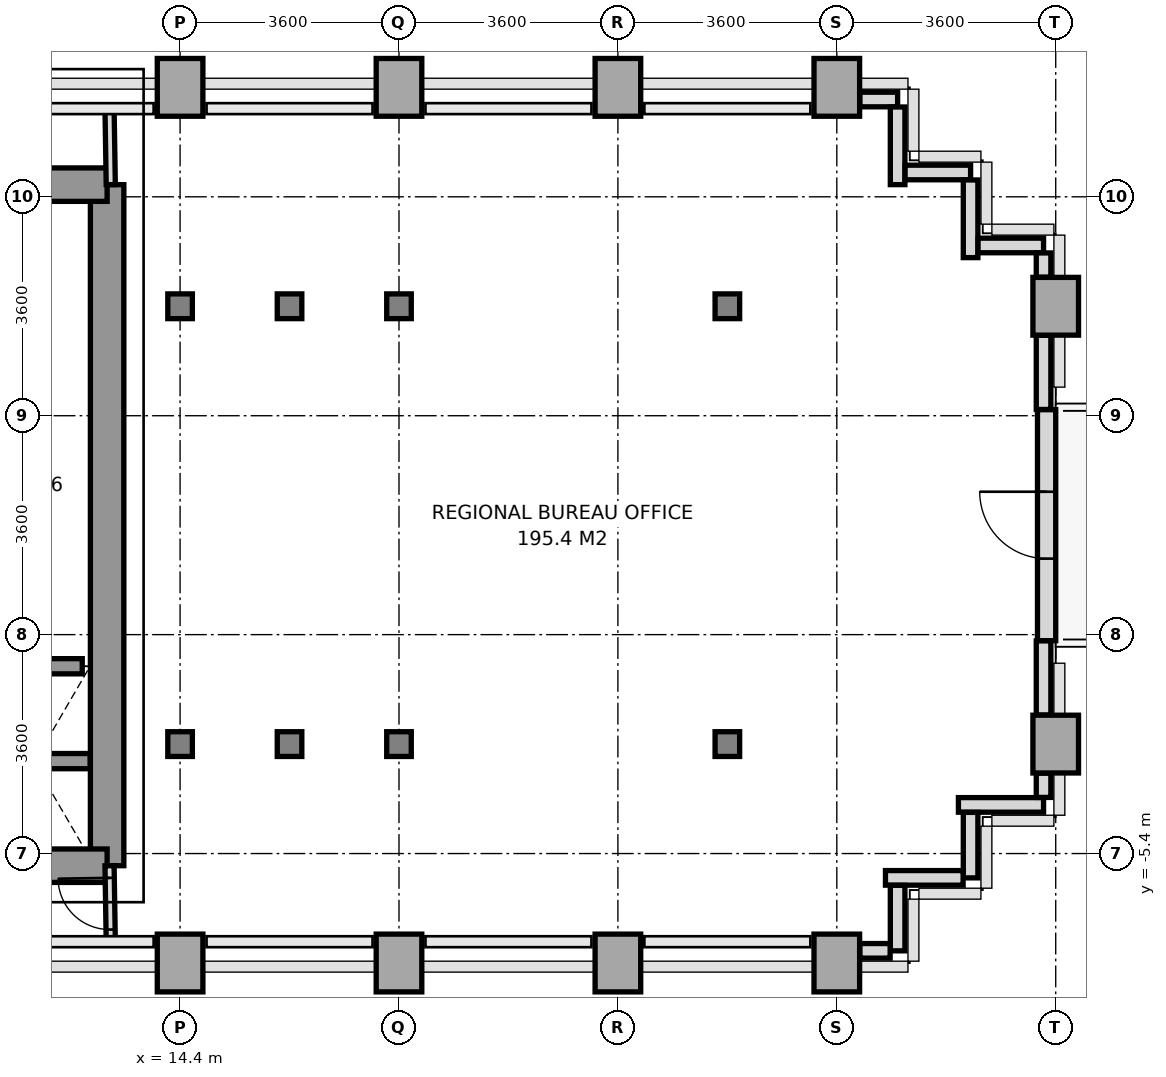
"""IFC4 building model, lengths in metres.
Left out: names, types, materials, properties, quantities, classifications, styles, units other than length and angle.
Written with IfcOpenShell. Run it as: python <this file> out.ifc"""

import sys

from ifc_helpers import new_model, si_unit, direction, frame, frame_2d, origin, origin_2d, place, context, subcontext, project, spatial, rectangle, i_section, extrude, source, transform, mapped, element, fill, save


model = new_model("IFC4")
c1 = context("Model", 3, precision=1e-05, world=origin(), true_north=direction((0.0, 1.0)))
c2 = subcontext(c1, "Body", "Model", "MODEL_VIEW")
j1 = project(units=[si_unit("LENGTHUNIT", "METRE"), si_unit("PLANEANGLEUNIT", "RADIAN")], contexts=[c1])
p1 = place(None, origin())
s1 = spatial("IfcSite", under=j1, at=p1, CompositionType="ELEMENT")
p2 = place(p1, origin())
s2 = spatial("IfcBuilding", under=s1, at=p2, CompositionType="ELEMENT")
p3 = place(p2, frame((0.0, 0.0, 47.6)))
s3 = spatial("IfcBuildingStorey", under=s2, at=p3, CompositionType="ELEMENT", Elevation=47.6)
m1 = source(origin(), c2, "Body", "SweptSolid", [
    extrude(rectangle(XDim=0.75, YDim=0.95, at=origin_2d()), origin(), (0.0, 0.0, 1.0), 3.2),
])
p4 = place(p3, frame((14.4, -7.2, 0.0), z_axis=(0.0, 0.0, 1.0), x_axis=(1.0, 0.0, 0.0)))
e1 = element("IfcColumn", 1, at=p4, inside=s3, PredefinedType="COLUMN", context=c2, shape_type="MappedRepresentation", body=[
    mapped(m1, transform((0.0, 0.0, 0.0), x_axis=(1.0, 0.0, 0.0), y_axis=(0.0, 1.0, 0.0), z_axis=(0.0, 0.0, 1.0), scale=1.0)),
])
m2 = source(origin(), c2, "Body", "SweptSolid", [
    extrude(i_section(OverallWidth=0.404, OverallDepth=0.407, WebThickness=0.022, FlangeThickness=0.035, at=origin_2d()), origin(), (0.0, 0.0, 1.0), 3.2),
])
for number, where, z_axis, x_axis in (
    (2, (14.4, -3.6, 0.0), (0.0, 0.0, 1.0), (1.0, 0.0, 0.0)),
    (3, (14.4, 3.6, 0.0), (0.0, 0.0, 1.0), (1.0, 0.0, 0.0)),
):
    element("IfcColumn", number, at=place(p3, frame(where, z_axis=z_axis, x_axis=x_axis)), inside=s3, PredefinedType="COLUMN", context=c2, shape_type="MappedRepresentation", body=[
        mapped(m2, transform((0.0, 0.0, 0.0), x_axis=(1.0, 0.0, 0.0), y_axis=(0.0, 1.0, 0.0), z_axis=(0.0, 0.0, 1.0), scale=1.0)),
    ])
p5 = place(p3, frame((14.4, 7.2, 0.0), z_axis=(0.0, 0.0, 1.0), x_axis=(1.0, 0.0, 0.0)))
e4 = element("IfcColumn", 4, at=p5, inside=s3, PredefinedType="COLUMN", context=c2, shape_type="MappedRepresentation", body=[
    mapped(m1, transform((0.0, 0.0, 0.0), x_axis=(1.0, 0.0, 0.0), y_axis=(0.0, 1.0, 0.0), z_axis=(0.0, 0.0, 1.0), scale=1.0)),
])
for number, where, z_axis, x_axis in (
    (5, (16.2, -3.6, 0.0), (0.0, 0.0, 1.0), (1.0, 0.0, 0.0)),
    (6, (16.2, 3.6, 0.0), (0.0, 0.0, 1.0), (1.0, 0.0, 0.0)),
):
    element("IfcColumn", number, at=place(p3, frame(where, z_axis=z_axis, x_axis=x_axis)), inside=s3, PredefinedType="COLUMN", context=c2, shape_type="MappedRepresentation", body=[
        mapped(m2, transform((0.0, 0.0, 0.0), x_axis=(1.0, 0.0, 0.0), y_axis=(0.0, 1.0, 0.0), z_axis=(0.0, 0.0, 1.0), scale=1.0)),
    ])
p6 = place(p3, frame((18.0, -7.2, 0.0), z_axis=(0.0, 0.0, 1.0), x_axis=(1.0, 0.0, 0.0)))
e7 = element("IfcColumn", 7, at=p6, inside=s3, PredefinedType="COLUMN", context=c2, shape_type="MappedRepresentation", body=[
    mapped(m1, transform((0.0, 0.0, 0.0), x_axis=(1.0, 0.0, 0.0), y_axis=(0.0, 1.0, 0.0), z_axis=(0.0, 0.0, 1.0), scale=1.0)),
])
for number, where, z_axis, x_axis in (
    (8, (18.0, -3.6, 0.0), (0.0, 0.0, 1.0), (1.0, 0.0, 0.0)),
    (9, (18.0, 3.6, 0.0), (0.0, 0.0, 1.0), (1.0, 0.0, 0.0)),
):
    element("IfcColumn", number, at=place(p3, frame(where, z_axis=z_axis, x_axis=x_axis)), inside=s3, PredefinedType="COLUMN", context=c2, shape_type="MappedRepresentation", body=[
        mapped(m2, transform((0.0, 0.0, 0.0), x_axis=(1.0, 0.0, 0.0), y_axis=(0.0, 1.0, 0.0), z_axis=(0.0, 0.0, 1.0), scale=1.0)),
    ])
for number, where, z_axis, x_axis in (
    (10, (18.0, 7.2, 0.0), (0.0, 0.0, 1.0), (1.0, 0.0, 0.0)),
    (11, (21.6, -7.2, 0.0), (0.0, 0.0, 1.0), (1.0, 0.0, 0.0)),
    (12, (21.6, 7.2, 0.0), (0.0, 0.0, 1.0), (1.0, 0.0, 0.0)),
):
    element("IfcColumn", number, at=place(p3, frame(where, z_axis=z_axis, x_axis=x_axis)), inside=s3, PredefinedType="COLUMN", context=c2, shape_type="MappedRepresentation", body=[
        mapped(m1, transform((0.0, 0.0, 0.0), x_axis=(1.0, 0.0, 0.0), y_axis=(0.0, 1.0, 0.0), z_axis=(0.0, 0.0, 1.0), scale=1.0)),
    ])
for number, where, z_axis, x_axis in (
    (13, (23.4, -3.6, 0.0), (0.0, 0.0, 1.0), (1.0, 0.0, 0.0)),
    (14, (23.4, 3.6, 0.0), (0.0, 0.0, 1.0), (1.0, 0.0, 0.0)),
):
    element("IfcColumn", number, at=place(p3, frame(where, z_axis=z_axis, x_axis=x_axis)), inside=s3, PredefinedType="COLUMN", context=c2, shape_type="MappedRepresentation", body=[
        mapped(m2, transform((0.0, 0.0, 0.0), x_axis=(1.0, 0.0, 0.0), y_axis=(0.0, 1.0, 0.0), z_axis=(0.0, 0.0, 1.0), scale=1.0)),
    ])
for number, where, z_axis, x_axis in (
    (15, (25.2, -7.2, 0.0), (0.0, 0.0, 1.0), (1.0, 0.0, 0.0)),
    (16, (25.2, 7.2, 0.0), (0.0, 0.0, 1.0), (1.0, 0.0, 0.0)),
    (17, (28.8, -3.6, 0.0), (0.0, 0.0, 1.0), (1.0, 0.0, 0.0)),
    (18, (28.8, 3.6, 0.0), (0.0, 0.0, 1.0), (1.0, 0.0, 0.0)),
):
    element("IfcColumn", number, at=place(p3, frame(where, z_axis=z_axis, x_axis=x_axis)), inside=s3, PredefinedType="COLUMN", context=c2, shape_type="MappedRepresentation", body=[
        mapped(m1, transform((0.0, 0.0, 0.0), x_axis=(1.0, 0.0, 0.0), y_axis=(0.0, 1.0, 0.0), z_axis=(0.0, 0.0, 1.0), scale=1.0)),
    ])
p7 = place(p3, frame((28.65, -1.9, 0.0), z_axis=(0.0, 0.0, 1.0), x_axis=(0.0, 1.0, 0.0)))
e19 = element("IfcWall", 19, at=p7, inside=s3, PredefinedType="SOLIDWALL", context=c2, shape_type="SweptSolid", body=[
    extrude(rectangle(XDim=3.8, YDim=0.3, at=frame_2d((1.9, 0.0))), origin(), (0.0, 0.0, 1.0), 2.45),
])
p8 = place(p7, frame((1.35, 0.0, 0.0)))
e20 = element("IfcOpeningElement", 20, at=p8, cuts=e19, PredefinedType="OPENING", context=c2, shape_type="SweptSolid", body=[
    extrude(rectangle(XDim=1.1, YDim=2.3, at=frame_2d((0.55, 1.15))), frame((0.0, 0.16, 0.0), z_axis=(0.0, -1.0, 0.0), x_axis=(1.0, 0.0, 0.0)), (0.0, 0.0, 1.0), 0.32),
])
p9 = place(p3, frame((28.6, -4.6, 0.0), z_axis=(0.0, 0.0, 1.0), x_axis=(-1.0, 0.0, 0.0)))
e21 = element("IfcWall", 21, at=p9, inside=s3, PredefinedType="PARAPET", context=c2, shape_type="SweptSolid", body=[
    extrude(rectangle(XDim=1.4, YDim=0.24, at=frame_2d((0.7, 0.0))), origin(), (0.0, 0.0, 1.0), 1.15),
])
p10 = place(p3, frame((27.4, -4.723, 0.0), z_axis=(0.0, 0.0, 1.0), x_axis=(0.0, -1.0, 0.0)))
e22 = element("IfcWall", 22, at=p10, inside=s3, PredefinedType="PARAPET", context=c2, shape_type="SweptSolid", body=[
    extrude(rectangle(XDim=1.077, YDim=0.24, at=frame_2d((0.539, 0.0))), origin(), (0.0, 0.0, 1.0), 1.15),
])
p11 = place(p3, frame((27.277, -5.8, 0.0), z_axis=(0.0, 0.0, 1.0), x_axis=(-1.0, 0.0, 0.0)))
e23 = element("IfcWall", 23, at=p11, inside=s3, PredefinedType="PARAPET", context=c2, shape_type="SweptSolid", body=[
    extrude(rectangle(XDim=1.277, YDim=0.24, at=frame_2d((0.639, 0.0))), origin(), (0.0, 0.0, 1.0), 1.15),
])
p12 = place(p3, frame((26.2, -5.923, 0.0), z_axis=(0.0, 0.0, 1.0), x_axis=(0.0, -1.0, 0.0)))
e24 = element("IfcWall", 24, at=p12, inside=s3, PredefinedType="PARAPET", context=c2, shape_type="SweptSolid", body=[
    extrude(rectangle(XDim=1.077, YDim=0.24, at=frame_2d((0.539, 0.0))), origin(), (0.0, 0.0, 1.0), 1.15),
])
p13 = place(p3, frame((26.077, -7.0, 0.0), z_axis=(0.0, 0.0, 1.0), x_axis=(-1.0, 0.0, 0.0)))
e25 = element("IfcWall", 25, at=p13, inside=s3, PredefinedType="PARAPET", context=c2, shape_type="SweptSolid", body=[
    extrude(rectangle(XDim=0.499, YDim=0.24, at=frame_2d((0.25, 0.0))), origin(), (0.0, 0.0, 1.0), 1.15),
])
p14 = place(p3, frame((25.578, 7.0, 0.0), z_axis=(0.0, 0.0, 1.0), x_axis=(1.0, 0.0, 0.0)))
e26 = element("IfcWall", 26, at=p14, inside=s3, PredefinedType="PARAPET", context=c2, shape_type="SweptSolid", body=[
    extrude(rectangle(XDim=0.622, YDim=0.24, at=frame_2d((0.311, 0.0))), origin(), (0.0, 0.0, 1.0), 1.15),
])
p15 = place(p3, frame((26.2, 6.877, 0.0), z_axis=(0.0, 0.0, 1.0), x_axis=(0.0, -1.0, 0.0)))
e27 = element("IfcWall", 27, at=p15, inside=s3, PredefinedType="PARAPET", context=c2, shape_type="SweptSolid", body=[
    extrude(rectangle(XDim=1.277, YDim=0.24, at=frame_2d((0.638, 0.0))), origin(), (0.0, 0.0, 1.0), 1.15),
])
p16 = place(p3, frame((26.323, 5.8, 0.0), z_axis=(0.0, 0.0, 1.0), x_axis=(1.0, 0.0, 0.0)))
e28 = element("IfcWall", 28, at=p16, inside=s3, PredefinedType="PARAPET", context=c2, shape_type="SweptSolid", body=[
    extrude(rectangle(XDim=1.077, YDim=0.24, at=frame_2d((0.539, 0.0))), origin(), (0.0, 0.0, 1.0), 1.15),
])
p17 = place(p3, frame((27.4, 5.677, 0.0), z_axis=(0.0, 0.0, 1.0), x_axis=(0.0, -1.0, 0.0)))
e29 = element("IfcWall", 29, at=p17, inside=s3, PredefinedType="PARAPET", context=c2, shape_type="SweptSolid", body=[
    extrude(rectangle(XDim=1.277, YDim=0.24, at=frame_2d((0.639, 0.0))), origin(), (0.0, 0.0, 1.0), 1.15),
])
p18 = place(p3, frame((27.523, 4.6, 0.0), z_axis=(0.0, 0.0, 1.0), x_axis=(1.0, 0.0, 0.0)))
e30 = element("IfcWall", 30, at=p18, inside=s3, PredefinedType="PARAPET", context=c2, shape_type="SweptSolid", body=[
    extrude(rectangle(XDim=1.077, YDim=0.24, at=frame_2d((0.539, 0.0))), origin(), (0.0, 0.0, 1.0), 1.15),
])
p19 = place(p3, frame((28.6, 4.477, 0.0), z_axis=(0.0, 0.0, 1.0), x_axis=(0.0, -1.0, 0.0)))
e31 = element("IfcWall", 31, at=p19, inside=s3, PredefinedType="PARAPET", context=c2, shape_type="SweptSolid", body=[
    extrude(rectangle(XDim=0.399, YDim=0.24, at=frame_2d((0.2, 0.0))), origin(), (0.0, 0.0, 1.0), 1.15),
])
for number, where, z_axis, x_axis in (
    (32, (28.6, 3.122, 0.0), (0.0, 0.0, 1.0), (0.0, -1.0, 0.0)),
    (33, (28.6, -1.903, 0.0), (0.0, 0.0, 1.0), (0.0, -1.0, 0.0)),
):
    element("IfcWall", number, at=place(p3, frame(where, z_axis=z_axis, x_axis=x_axis)), inside=s3, PredefinedType="PARAPET", context=c2, shape_type="SweptSolid", body=[
        extrude(rectangle(XDim=1.219, YDim=0.24, at=frame_2d((0.609, 0.0))), origin(), (0.0, 0.0, 1.0), 1.15),
    ])
p20 = place(p3, frame((28.6, -4.078, 0.0), z_axis=(0.0, 0.0, 1.0), x_axis=(0.0, -1.0, 0.0)))
e34 = element("IfcWall", 34, at=p20, inside=s3, PredefinedType="PARAPET", context=c2, shape_type="SweptSolid", body=[
    extrude(rectangle(XDim=0.399, YDim=0.24, at=frame_2d((0.2, 0.0))), origin(), (0.0, 0.0, 1.0), 1.15),
])
p21 = place(p3, frame((13.2, -5.6, 0.0), z_axis=(0.0, 0.0, 1.0), x_axis=(0.0, 1.0, 0.0)))
e35 = element("IfcWall", 35, at=p21, inside=s3, PredefinedType="SHEAR", context=c2, shape_type="SweptSolid", body=[
    extrude(rectangle(XDim=11.2, YDim=0.55, at=frame_2d((5.6, 0.0))), origin(), (0.0, 0.0, 1.0), 3.2),
])
p22 = place(p3, frame((11.381, 5.6, 0.0), z_axis=(0.0, 0.0, 1.0), x_axis=(1.0, 0.0, 0.0)))
e36 = element("IfcWall", 36, at=p22, inside=s3, PredefinedType="SHEAR", context=c2, shape_type="SweptSolid", body=[
    extrude(rectangle(XDim=1.819, YDim=0.55, at=frame_2d((0.909, 0.0))), origin(), (0.0, 0.0, 1.0), 3.2),
])
p23 = place(p3, frame((5.4, -5.6, 0.0), z_axis=(0.0, 0.0, 1.0), x_axis=(1.0, 0.0, 0.0)))
e37 = element("IfcWall", 37, at=p23, inside=s3, PredefinedType="SHEAR", context=c2, shape_type="SweptSolid", body=[
    extrude(rectangle(XDim=7.8, YDim=0.55, at=frame_2d((3.9, 0.0))), origin(), (0.0, 0.0, 1.0), 3.2),
])
p24 = place(p23, frame((3.0, 0.0, 0.0)))
e38 = element("IfcOpeningElement", 38, at=p24, cuts=e37, PredefinedType="OPENING", context=c2, shape_type="SweptSolid", body=[
    extrude(rectangle(XDim=1.2, YDim=2.2, at=frame_2d((0.6, 1.1))), frame((0.0, 0.285, 0.0), z_axis=(0.0, -1.0, 0.0), x_axis=(1.0, 0.0, 0.0)), (0.0, 0.0, 1.0), 0.57),
])
p25 = place(p3, frame((11.08, -3.88, 0.0), z_axis=(0.0, 0.0, 1.0), x_axis=(1.0, 0.0, 0.0)))
e39 = element("IfcWall", 39, at=p25, inside=s3, PredefinedType="SOLIDWALL", context=c2, shape_type="SweptSolid", body=[
    extrude(rectangle(XDim=1.84, YDim=0.25, at=frame_2d((0.92, 0.0))), origin(), (0.0, 0.0, 1.0), 3.2),
])
p26 = place(p3, frame((11.209, -2.32, 0.0), z_axis=(0.0, 0.0, 1.0), x_axis=(1.0, 0.0, 0.0)))
e40 = element("IfcWall", 40, at=p26, inside=s3, PredefinedType="SOLIDWALL", context=c2, shape_type="SweptSolid", body=[
    extrude(rectangle(XDim=1.582, YDim=0.25, at=frame_2d((0.791, 0.0))), origin(), (0.0, 0.0, 1.0), 3.2),
])
p27 = place(p3, frame((13.26, 5.6, 0.0), z_axis=(0.0, 0.0, 1.0), x_axis=(-0.016013571389, 0.999871774545, 0.0)))
e41 = element("IfcWall", 41, at=p27, inside=s3, PredefinedType="PARTITIONING", context=c2, shape_type="SweptSolid", body=[
    extrude(rectangle(XDim=1.25, YDim=0.15, at=frame_2d((0.625, 0.0))), origin(), (0.0, 0.0, 1.0), 3.2),
])
p28 = place(p3, frame((13.26, -6.85, 0.0), z_axis=(0.0, 0.0, 1.0), x_axis=(-0.016013571389, 0.999871774545, 0.0)))
e42 = element("IfcWall", 42, at=p28, inside=s3, PredefinedType="PARTITIONING", context=c2, shape_type="SweptSolid", body=[
    extrude(rectangle(XDim=1.25, YDim=0.15, at=frame_2d((0.625, 0.0))), origin(), (0.0, 0.0, 1.0), 3.2),
])
p29 = place(p28, frame((0.2, 0.0, 0.0)))
e43 = element("IfcOpeningElement", 43, at=p29, cuts=e42, PredefinedType="OPENING", context=c2, shape_type="SweptSolid", body=[
    extrude(rectangle(XDim=0.85, YDim=2.1, at=frame_2d((0.425, 1.05))), frame((0.0, 0.085, 0.0), z_axis=(0.0, -1.0, 0.0), x_axis=(1.0, 0.0, 0.0)), (0.0, 0.0, 1.0), 0.17),
])
m3 = source(origin(), c2, "Body", "SweptSolid", [
    extrude(rectangle(XDim=1.1, YDim=2.3, at=frame_2d((0.55, 1.15))), frame((0.0, 0.025, 0.0), z_axis=(0.0, -1.0, 0.0), x_axis=(1.0, 0.0, 0.0)), (0.0, 0.0, 1.0), 0.05),
])
p30 = place(p8, frame((1.1, 0.0, 0.0), z_axis=(0.0, 0.0, 1.0), x_axis=(-1.0, 0.0, 0.0)))
e44 = element("IfcDoor", 44, at=p30, inside=s3, OperationType="SINGLE_SWING_RIGHT", PredefinedType="DOOR", context=c2, shape_type="MappedRepresentation", body=[
    mapped(m3, transform((0.0, 0.0, 0.0), x_axis=(1.0, 0.0, 0.0), y_axis=(0.0, 1.0, 0.0), z_axis=(0.0, 0.0, 1.0), scale=1.0)),
])
fill(e20, e44)
m4 = source(origin(), c2, "Body", "SweptSolid", [
    extrude(rectangle(XDim=0.85, YDim=2.1, at=frame_2d((0.425, 1.05))), frame((0.0, 0.025, 0.0), z_axis=(0.0, -1.0, 0.0), x_axis=(1.0, 0.0, 0.0)), (0.0, 0.0, 1.0), 0.05),
])
p31 = place(p29, origin())
e45 = element("IfcDoor", 45, at=p31, inside=s3, OperationType="SINGLE_SWING_RIGHT", PredefinedType="DOOR", context=c2, shape_type="MappedRepresentation", body=[
    mapped(m4, transform((0.0, 0.0, 0.0), x_axis=(1.0, 0.0, 0.0), y_axis=(0.0, 1.0, 0.0), z_axis=(0.0, 0.0, 1.0), scale=1.0)),
])
fill(e43, e45)
save(model, sys.argv[1])
